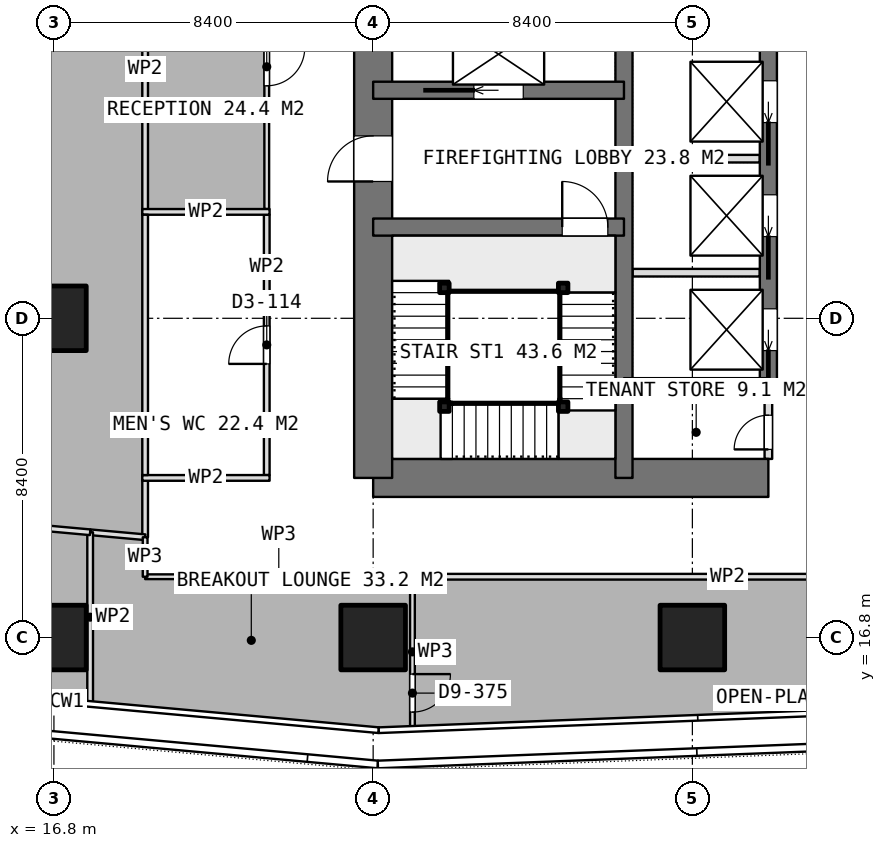
"""IFC4 building model, lengths in metres.
Left out: names, types, materials, properties, quantities, classifications, styles, units other than length and angle.
Written with IfcOpenShell. Run it as: python <this file> out.ifc"""

import sys

from ifc_helpers import new_model, si_unit, direction, frame, frame_2d, origin, origin_2d, place, context, subcontext, project, spatial, rectangle, extrude, element, fill, save


model = new_model("IFC4")
c1 = context("Model", 3, precision=1e-05, world=origin(), true_north=direction((0.0, 1.0)))
c2 = subcontext(c1, "Body", "Model", "MODEL_VIEW")
j1 = project(units=[si_unit("LENGTHUNIT", "METRE"), si_unit("PLANEANGLEUNIT", "RADIAN")], contexts=[c1])
p1 = place(None, origin())
s1 = spatial("IfcSite", under=j1, at=p1, CompositionType="ELEMENT")
p2 = place(p1, origin())
s2 = spatial("IfcBuilding", under=s1, at=p2, CompositionType="ELEMENT")
p3 = place(p2, frame((0.0, 0.0, 110.3)))
s3 = spatial("IfcBuildingStorey", under=s2, at=p3, CompositionType="ELEMENT", Elevation=110.3)
p4 = place(p3, frame((25.2, 21.0, 0.0), z_axis=(0.0, 0.0, 1.0), x_axis=(1.0, 0.0, 0.0)))
e1 = element("IfcWall", 1, at=p4, inside=s3, PredefinedType="SHEAR", context=c2, shape_type="SweptSolid", body=[
    extrude(rectangle(XDim=10.4, YDim=1.0, at=frame_2d((5.2, 0.0))), origin(), (0.0, 0.0, 1.0), 3.75),
])
p5 = place(p3, frame((25.2, 21.0, 0.0), z_axis=(0.0, 0.0, 1.0), x_axis=(0.0, 1.0, 0.0)))
e2 = element("IfcWall", 2, at=p5, inside=s3, PredefinedType="SHEAR", context=c2, shape_type="SweptSolid", body=[
    extrude(rectangle(XDim=25.2, YDim=1.0, at=frame_2d((12.6, 0.0))), origin(), (0.0, 0.0, 1.0), 3.75),
])
p6 = place(p5, frame((7.8, 0.0, 0.0)))
e3 = element("IfcOpeningElement", 3, at=p6, cuts=e2, PredefinedType="OPENING", context=c2, shape_type="SweptSolid", body=[
    extrude(rectangle(XDim=1.2, YDim=2.1, at=frame_2d((0.6, 1.05))), frame((0.0, 0.51, 0.0), z_axis=(0.0, -1.0, 0.0), x_axis=(1.0, 0.0, 0.0)), (0.0, 0.0, 1.0), 1.02),
])
p7 = place(p5, frame((14.25, 0.0, 0.0)))
e4 = element("IfcOpeningElement", 4, at=p7, cuts=e2, PredefinedType="OPENING", context=c2, shape_type="SweptSolid", body=[
    extrude(rectangle(XDim=0.9, YDim=2.1, at=frame_2d((0.45, 1.05))), frame((0.0, 0.51, 0.0), z_axis=(0.0, -1.0, 0.0), x_axis=(1.0, 0.0, 0.0)), (0.0, 0.0, 1.0), 1.02),
])
p8 = place(p5, frame((16.85, 0.0, 0.0)))
e5 = element("IfcOpeningElement", 5, at=p8, cuts=e2, PredefinedType="OPENING", context=c2, shape_type="SweptSolid", body=[
    extrude(rectangle(XDim=0.9, YDim=2.1, at=frame_2d((0.45, 1.05))), frame((0.0, 0.51, 0.0), z_axis=(0.0, -1.0, 0.0), x_axis=(1.0, 0.0, 0.0)), (0.0, 0.0, 1.0), 1.02),
])
p9 = place(p5, frame((19.025, 0.0, 0.0)))
e6 = element("IfcOpeningElement", 6, at=p9, cuts=e2, PredefinedType="OPENING", context=c2, shape_type="SweptSolid", body=[
    extrude(rectangle(XDim=1.2, YDim=2.1, at=frame_2d((0.6, 1.05))), frame((0.0, 0.51, 0.0), z_axis=(0.0, -1.0, 0.0), x_axis=(1.0, 0.0, 0.0)), (0.0, 0.0, 1.0), 1.02),
])
p10 = place(p3, frame((31.8, 21.0, 0.0), z_axis=(0.0, 0.0, 1.0), x_axis=(0.0, 1.0, 0.0)))
e7 = element("IfcWall", 7, at=p10, inside=s3, PredefinedType="SHEAR", context=c2, shape_type="SweptSolid", body=[
    extrude(rectangle(XDim=25.2, YDim=0.45, at=frame_2d((12.6, 0.0))), origin(), (0.0, 0.0, 1.0), 3.75),
])
p11 = place(p3, frame((35.6, 23.4, 0.0), z_axis=(0.0, 0.0, 1.0), x_axis=(0.0, 1.0, 0.0)))
e8 = element("IfcWall", 8, at=p11, inside=s3, PredefinedType="SHEAR", context=c2, shape_type="SweptSolid", body=[
    extrude(rectangle(XDim=18.0, YDim=0.45, at=frame_2d((9.0, 0.0))), origin(), (0.0, 0.0, 1.0), 3.75),
])
p12 = place(p11, frame((0.95, 0.0, 0.0)))
e9 = element("IfcOpeningElement", 9, at=p12, cuts=e8, PredefinedType="OPENING", context=c2, shape_type="SweptSolid", body=[
    extrude(rectangle(XDim=1.1, YDim=2.1, at=frame_2d((0.55, 1.05))), frame((0.0, 0.235, 0.0), z_axis=(0.0, -1.0, 0.0), x_axis=(1.0, 0.0, 0.0)), (0.0, 0.0, 1.0), 0.47),
])
p13 = place(p11, frame((3.95, 0.0, 0.0)))
e10 = element("IfcOpeningElement", 10, at=p13, cuts=e8, PredefinedType="OPENING", context=c2, shape_type="SweptSolid", body=[
    extrude(rectangle(XDim=1.1, YDim=2.1, at=frame_2d((0.55, 1.05))), frame((0.0, 0.235, 0.0), z_axis=(0.0, -1.0, 0.0), x_axis=(1.0, 0.0, 0.0)), (0.0, 0.0, 1.0), 0.47),
])
p14 = place(p11, frame((6.95, 0.0, 0.0)))
e11 = element("IfcOpeningElement", 11, at=p14, cuts=e8, PredefinedType="OPENING", context=c2, shape_type="SweptSolid", body=[
    extrude(rectangle(XDim=1.1, YDim=2.1, at=frame_2d((0.55, 1.05))), frame((0.0, 0.235, 0.0), z_axis=(0.0, -1.0, 0.0), x_axis=(1.0, 0.0, 0.0)), (0.0, 0.0, 1.0), 0.47),
])
p15 = place(p11, frame((9.95, 0.0, 0.0)))
e12 = element("IfcOpeningElement", 12, at=p15, cuts=e8, PredefinedType="OPENING", context=c2, shape_type="SweptSolid", body=[
    extrude(rectangle(XDim=1.1, YDim=2.1, at=frame_2d((0.55, 1.05))), frame((0.0, 0.235, 0.0), z_axis=(0.0, -1.0, 0.0), x_axis=(1.0, 0.0, 0.0)), (0.0, 0.0, 1.0), 0.47),
])
p16 = place(p11, frame((12.95, 0.0, 0.0)))
e13 = element("IfcOpeningElement", 13, at=p16, cuts=e8, PredefinedType="OPENING", context=c2, shape_type="SweptSolid", body=[
    extrude(rectangle(XDim=1.1, YDim=2.1, at=frame_2d((0.55, 1.05))), frame((0.0, 0.235, 0.0), z_axis=(0.0, -1.0, 0.0), x_axis=(1.0, 0.0, 0.0)), (0.0, 0.0, 1.0), 0.47),
])
p17 = place(p11, frame((15.95, 0.0, 0.0)))
e14 = element("IfcOpeningElement", 14, at=p17, cuts=e8, PredefinedType="OPENING", context=c2, shape_type="SweptSolid", body=[
    extrude(rectangle(XDim=1.1, YDim=2.1, at=frame_2d((0.55, 1.05))), frame((0.0, 0.235, 0.0), z_axis=(0.0, -1.0, 0.0), x_axis=(1.0, 0.0, 0.0)), (0.0, 0.0, 1.0), 0.47),
])
p18 = place(p3, frame((31.8, 23.4, 0.0), z_axis=(0.0, 0.0, 1.0), x_axis=(1.0, 0.0, 0.0)))
e15 = element("IfcWall", 15, at=p18, inside=s3, PredefinedType="SHEAR", context=c2, shape_type="SweptSolid", body=[
    extrude(rectangle(XDim=3.8, YDim=0.45, at=frame_2d((1.9, 0.0))), origin(), (0.0, 0.0, 1.0), 3.75),
])
p19 = place(p3, frame((25.2, 27.6, 0.0), z_axis=(0.0, 0.0, 1.0), x_axis=(1.0, 0.0, 0.0)))
e16 = element("IfcWall", 16, at=p19, inside=s3, PredefinedType="SHEAR", context=c2, shape_type="SweptSolid", body=[
    extrude(rectangle(XDim=6.6, YDim=0.45, at=frame_2d((3.3, 0.0))), origin(), (0.0, 0.0, 1.0), 3.75),
])
p20 = place(p19, frame((4.975, 0.0, 0.0)))
e17 = element("IfcOpeningElement", 17, at=p20, cuts=e16, PredefinedType="OPENING", context=c2, shape_type="SweptSolid", body=[
    extrude(rectangle(XDim=1.2, YDim=2.1, at=frame_2d((0.6, 1.05))), frame((0.0, 0.235, 0.0), z_axis=(0.0, -1.0, 0.0), x_axis=(1.0, 0.0, 0.0)), (0.0, 0.0, 1.0), 0.47),
])
p21 = place(p3, frame((25.2, 31.2, 0.0), z_axis=(0.0, 0.0, 1.0), x_axis=(1.0, 0.0, 0.0)))
e18 = element("IfcWall", 18, at=p21, inside=s3, PredefinedType="SHEAR", context=c2, shape_type="SweptSolid", body=[
    extrude(rectangle(XDim=6.6, YDim=0.45, at=frame_2d((3.3, 0.0))), origin(), (0.0, 0.0, 1.0), 3.75),
])
p22 = place(p21, frame((2.65, 0.0, 0.0)))
e19 = element("IfcOpeningElement", 19, at=p22, cuts=e18, PredefinedType="OPENING", context=c2, shape_type="SweptSolid", body=[
    extrude(rectangle(XDim=1.3, YDim=2.1, at=frame_2d((0.65, 1.05))), frame((0.0, 0.235, 0.0), z_axis=(0.0, -1.0, 0.0), x_axis=(1.0, 0.0, 0.0)), (0.0, 0.0, 1.0), 0.47),
])
for number, where, z_axis, x_axis in (
    (20, (16.8, 16.8, 0.0), (0.0, 0.0, 1.0), (1.0, 0.0, 0.0)),
    (21, (16.8, 25.2, 0.0), (0.0, 0.0, 1.0), (1.0, 0.0, 0.0)),
    (22, (25.2, 16.8, 0.0), (0.0, 0.0, 1.0), (1.0, 0.0, 0.0)),
    (23, (33.6, 16.8, 0.0), (0.0, 0.0, 1.0), (1.0, 0.0, 0.0)),
):
    element("IfcColumn", number, at=place(p3, frame(where, z_axis=z_axis, x_axis=x_axis)), inside=s3, PredefinedType="COLUMN", context=c2, shape_type="SweptSolid", body=[
        extrude(rectangle(XDim=1.7, YDim=1.7, at=origin_2d()), origin(), (0.0, 0.0, 1.0), 3.75),
    ])
for number, where, z_axis, x_axis in (
    (24, (32.025, 26.4, 0.0), (0.0, 0.0, 1.0), (1.0, 0.0, 0.0)),
    (25, (32.025, 29.4, 0.0), (0.0, 0.0, 1.0), (1.0, 0.0, 0.0)),
):
    element("IfcWall", number, at=place(p3, frame(where, z_axis=z_axis, x_axis=x_axis)), inside=s3, PredefinedType="PARTITIONING", context=c2, shape_type="SweptSolid", body=[
        extrude(rectangle(XDim=3.35, YDim=0.2, at=frame_2d((1.675, 0.0))), origin(), (0.0, 0.0, 1.0), 3.5),
    ])
p23 = place(p3, frame((35.6, 21.5, 0.0), z_axis=(0.0, 0.0, 1.0), x_axis=(0.0, 1.0, 0.0)))
e26 = element("IfcWall", 26, at=p23, inside=s3, PredefinedType="PARTITIONING", context=c2, shape_type="SweptSolid", body=[
    extrude(rectangle(XDim=1.675, YDim=0.2, at=frame_2d((0.837, 0.0))), origin(), (0.0, 0.0, 1.0), 3.5),
])
p24 = place(p23, frame((0.25, 0.0, 0.0)))
e27 = element("IfcOpeningElement", 27, at=p24, cuts=e26, PredefinedType="OPENING", context=c2, shape_type="SweptSolid", body=[
    extrude(rectangle(XDim=0.9, YDim=2.1, at=frame_2d((0.45, 1.05))), frame((0.0, 0.11, 0.0), z_axis=(0.0, -1.0, 0.0), x_axis=(1.0, 0.0, 0.0)), (0.0, 0.0, 1.0), 0.22),
])
for number, where, z_axis, x_axis in (
    (28, (19.125, 21.0, 0.0), (0.0, 0.0, 1.0), (1.0, 0.0, 0.0)),
    (29, (19.125, 28.0, 0.0), (0.0, 0.0, 1.0), (1.0, 0.0, 0.0)),
):
    element("IfcWall", number, at=place(p3, frame(where, z_axis=z_axis, x_axis=x_axis)), inside=s3, PredefinedType="PARTITIONING", context=c2, shape_type="SweptSolid", body=[
        extrude(rectangle(XDim=3.35, YDim=0.15, at=frame_2d((1.675, 0.0))), origin(), (0.0, 0.0, 1.0), 3.5),
    ])
p25 = place(p3, frame((19.2, 21.075, 0.0), z_axis=(0.0, 0.0, 1.0), x_axis=(0.0, 1.0, 0.0)))
e30 = element("IfcWall", 30, at=p25, inside=s3, PredefinedType="PARTITIONING", context=c2, shape_type="SweptSolid", body=[
    extrude(rectangle(XDim=6.85, YDim=0.15, at=frame_2d((3.425, 0.0))), origin(), (0.0, 0.0, 1.0), 3.5),
])
p26 = place(p3, frame((22.4, 21.075, 0.0), z_axis=(0.0, 0.0, 1.0), x_axis=(0.0, 1.0, 0.0)))
e31 = element("IfcWall", 31, at=p26, inside=s3, PredefinedType="PARTITIONING", context=c2, shape_type="SweptSolid", body=[
    extrude(rectangle(XDim=6.85, YDim=0.15, at=frame_2d((3.425, 0.0))), origin(), (0.0, 0.0, 1.0), 3.5),
])
p27 = place(p26, frame((2.925, 0.0, 0.0)))
e32 = element("IfcOpeningElement", 32, at=p27, cuts=e31, PredefinedType="OPENING", context=c2, shape_type="SweptSolid", body=[
    extrude(rectangle(XDim=1.0, YDim=2.1, at=frame_2d((0.5, 1.05))), frame((0.0, 0.085, 0.0), z_axis=(0.0, -1.0, 0.0), x_axis=(1.0, 0.0, 0.0)), (0.0, 0.0, 1.0), 0.17),
])
p28 = place(p3, frame((19.2, 35.575, 0.0), z_axis=(0.0, 0.0, 1.0), x_axis=(0.0, -1.0, 0.0)))
e33 = element("IfcWall", 33, at=p28, inside=s3, PredefinedType="PARTITIONING", context=c2, shape_type="SweptSolid", body=[
    extrude(rectangle(XDim=7.65, YDim=0.15, at=frame_2d((3.825, 0.0))), origin(), (0.0, 0.0, 1.0), 3.5),
])
p29 = place(p3, frame((19.2, 21.075, 0.0), z_axis=(0.0, 0.0, 1.0), x_axis=(0.0, -1.0, 0.0)))
e34 = element("IfcWall", 34, at=p29, inside=s3, PredefinedType="PARTITIONING", context=c2, shape_type="SweptSolid", body=[
    extrude(rectangle(XDim=1.636, YDim=0.15, at=frame_2d((0.818, 0.0))), origin(), (0.0, 0.0, 1.0), 3.5),
])
p30 = place(p3, frame((19.2, 19.439, 0.0), z_axis=(0.0, 0.0, 1.0), x_axis=(-0.995920706464, 0.090232734836, 0.0)))
e35 = element("IfcWall", 35, at=p30, inside=s3, PredefinedType="PARTITIONING", context=c2, shape_type="SweptSolid", body=[
    extrude(rectangle(XDim=1.453, YDim=0.15, at=frame_2d((0.727, 0.0))), origin(), (0.0, 0.0, 1.0), 3.5),
])
p31 = place(p3, frame((17.753, 19.57, 0.0), z_axis=(0.0, 0.0, 1.0), x_axis=(0.0, -1.0, 0.0)))
e36 = element("IfcWall", 36, at=p31, inside=s3, PredefinedType="PARTITIONING", context=c2, shape_type="SweptSolid", body=[
    extrude(rectangle(XDim=4.468, YDim=0.15, at=frame_2d((2.234, 0.0))), origin(), (0.0, 0.0, 1.0), 3.5),
])
p32 = place(p3, frame((17.752, 19.57, 0.0), z_axis=(0.0, 0.0, 1.0), x_axis=(-0.995899251229, 0.090469229029, 0.0)))
e37 = element("IfcWall", 37, at=p32, inside=s3, PredefinedType="PARTITIONING", context=c2, shape_type="SweptSolid", body=[
    extrude(rectangle(XDim=6.288, YDim=0.15, at=frame_2d((3.144, 0.0))), origin(), (0.0, 0.0, 1.0), 3.5),
])
p33 = place(p32, frame((2.644, 0.0, 0.0)))
e38 = element("IfcOpeningElement", 38, at=p33, cuts=e37, PredefinedType="OPENING", context=c2, shape_type="SweptSolid", body=[
    extrude(rectangle(XDim=1.0, YDim=2.1, at=frame_2d((0.5, 1.05))), frame((0.0, 0.085, 0.0), z_axis=(0.0, -1.0, 0.0), x_axis=(1.0, 0.0, 0.0)), (0.0, 0.0, 1.0), 0.17),
])
p34 = place(p3, frame((19.2, 18.4, 0.0), z_axis=(0.0, 0.0, 1.0), x_axis=(1.0, 0.0, 0.0)))
e39 = element("IfcWall", 39, at=p34, inside=s3, PredefinedType="PARTITIONING", context=c2, shape_type="SweptSolid", body=[
    extrude(rectangle(XDim=7.034, YDim=0.125, at=frame_2d((3.517, 0.0))), origin(), (0.0, 0.0, 1.0), 3.5),
])
p35 = place(p3, frame((26.234, 18.4, 0.0), z_axis=(0.0, 0.0, 1.0), x_axis=(0.0, -1.0, 0.0)))
e40 = element("IfcWall", 40, at=p35, inside=s3, PredefinedType="PARTITIONING", context=c2, shape_type="SweptSolid", body=[
    extrude(rectangle(XDim=3.954, YDim=0.125, at=frame_2d((1.977, 0.0))), origin(), (0.0, 0.0, 1.0), 3.5),
])
p36 = place(p35, frame((2.562, 0.0, 0.0)))
e41 = element("IfcOpeningElement", 41, at=p36, cuts=e40, PredefinedType="OPENING", context=c2, shape_type="SweptSolid", body=[
    extrude(rectangle(XDim=1.0, YDim=2.1, at=frame_2d((0.5, 1.05))), frame((0.0, 0.073, 0.0), z_axis=(0.0, -1.0, 0.0), x_axis=(1.0, 0.0, 0.0)), (0.0, 0.0, 1.0), 0.145),
])
p37 = place(p3, frame((19.2, 19.439, 0.0), z_axis=(0.0, 0.0, 1.0), x_axis=(0.0, -1.0, 0.0)))
e42 = element("IfcWall", 42, at=p37, inside=s3, PredefinedType="PARTITIONING", context=c2, shape_type="SweptSolid", body=[
    extrude(rectangle(XDim=1.039, YDim=0.125, at=frame_2d((0.52, 0.0))), origin(), (0.0, 0.0, 1.0), 3.5),
])
p38 = place(p3, frame((22.4, 35.637, 0.0), z_axis=(0.0, 0.0, 1.0), x_axis=(0.0, -1.0, 0.0)))
e43 = element("IfcWall", 43, at=p38, inside=s3, PredefinedType="PARTITIONING", context=c2, shape_type="SweptSolid", body=[
    extrude(rectangle(XDim=7.562, YDim=0.125, at=frame_2d((3.781, 0.0))), origin(), (0.0, 0.0, 1.0), 3.5),
])
p39 = place(p38, frame((3.319, 0.0, 0.0)))
e44 = element("IfcOpeningElement", 44, at=p39, cuts=e43, PredefinedType="OPENING", context=c2, shape_type="SweptSolid", body=[
    extrude(rectangle(XDim=1.0, YDim=2.1, at=frame_2d((0.5, 1.05))), frame((0.0, 0.073, 0.0), z_axis=(0.0, -1.0, 0.0), x_axis=(1.0, 0.0, 0.0)), (0.0, 0.0, 1.0), 0.145),
])
p40 = place(p3, frame((26.234, 18.4, 0.0), z_axis=(0.0, 0.0, 1.0), x_axis=(1.0, 0.0, 0.0)))
e45 = element("IfcWall", 45, at=p40, inside=s3, PredefinedType="PARTITIONING", context=c2, shape_type="SweptSolid", body=[
    extrude(rectangle(XDim=23.702, YDim=0.15, at=frame_2d((11.851, 0.0))), origin(), (0.0, 0.0, 1.0), 3.5),
])
p41 = place(p40, frame((11.351, 0.0, 0.0)))
e46 = element("IfcOpeningElement", 46, at=p41, cuts=e45, PredefinedType="OPENING", context=c2, shape_type="SweptSolid", body=[
    extrude(rectangle(XDim=1.0, YDim=2.1, at=frame_2d((0.5, 1.05))), frame((0.0, 0.085, 0.0), z_axis=(0.0, -1.0, 0.0), x_axis=(1.0, 0.0, 0.0)), (0.0, 0.0, 1.0), 0.17),
])
for number, where, z_axis, x_axis in (
    (47, (30.2, 26.0, 0.0), (0.0, 0.0, 1.0), (1.0, 0.0, 0.0)),
    (48, (30.2, 22.875, 0.0), (0.0, 0.0, 1.0), (1.0, 0.0, 0.0)),
    (49, (27.075, 22.875, 0.0), (0.0, 0.0, 1.0), (1.0, 0.0, 0.0)),
    (50, (27.075, 26.0, 0.0), (0.0, 0.0, 1.0), (1.0, 0.0, 0.0)),
):
    element("IfcColumn", number, at=place(p3, frame(where, z_axis=z_axis, x_axis=x_axis)), inside=s3, PredefinedType="COLUMN", context=c2, shape_type="SweptSolid", body=[
        extrude(rectangle(XDim=0.25, YDim=0.25, at=origin_2d()), origin(), (0.0, 0.0, 1.0), 3.75),
    ])
p42 = place(p6, origin())
e51 = element("IfcDoor", 51, at=p42, inside=s3, OperationType="SINGLE_SWING_LEFT", PredefinedType="DOOR", context=c2, shape_type="SweptSolid", body=[
    extrude(rectangle(XDim=1.2, YDim=2.1, at=frame_2d((0.6, 1.05))), frame((0.0, 0.025, 0.0), z_axis=(0.0, -1.0, 0.0), x_axis=(1.0, 0.0, 0.0)), (0.0, 0.0, 1.0), 0.05),
])
fill(e3, e51)
p43 = place(p24, origin())
e52 = element("IfcDoor", 52, at=p43, inside=s3, OperationType="SINGLE_SWING_LEFT", PredefinedType="DOOR", context=c2, shape_type="SweptSolid", body=[
    extrude(rectangle(XDim=0.9, YDim=2.1, at=frame_2d((0.45, 1.05))), frame((0.0, 0.025, 0.0), z_axis=(0.0, -1.0, 0.0), x_axis=(1.0, 0.0, 0.0)), (0.0, 0.0, 1.0), 0.05),
])
fill(e27, e52)
p44 = place(p12, origin())
e53 = element("IfcDoor", 53, at=p44, inside=s3, OperationType="SLIDING_TO_LEFT", PredefinedType="USERDEFINED", context=c2, shape_type="SweptSolid", body=[
    extrude(rectangle(XDim=1.1, YDim=2.1, at=frame_2d((0.55, 1.05))), frame((0.0, 0.025, 0.0), z_axis=(0.0, -1.0, 0.0), x_axis=(1.0, 0.0, 0.0)), (0.0, 0.0, 1.0), 0.05),
])
fill(e9, e53)
p45 = place(p13, origin())
e54 = element("IfcDoor", 54, at=p45, inside=s3, OperationType="SLIDING_TO_LEFT", PredefinedType="USERDEFINED", context=c2, shape_type="SweptSolid", body=[
    extrude(rectangle(XDim=1.1, YDim=2.1, at=frame_2d((0.55, 1.05))), frame((0.0, 0.025, 0.0), z_axis=(0.0, -1.0, 0.0), x_axis=(1.0, 0.0, 0.0)), (0.0, 0.0, 1.0), 0.05),
])
fill(e10, e54)
p46 = place(p14, origin())
e55 = element("IfcDoor", 55, at=p46, inside=s3, OperationType="SLIDING_TO_LEFT", PredefinedType="USERDEFINED", context=c2, shape_type="SweptSolid", body=[
    extrude(rectangle(XDim=1.1, YDim=2.1, at=frame_2d((0.55, 1.05))), frame((0.0, 0.025, 0.0), z_axis=(0.0, -1.0, 0.0), x_axis=(1.0, 0.0, 0.0)), (0.0, 0.0, 1.0), 0.05),
])
fill(e11, e55)
p47 = place(p22, origin())
e56 = element("IfcDoor", 56, at=p47, inside=s3, OperationType="SLIDING_TO_LEFT", PredefinedType="USERDEFINED", context=c2, shape_type="SweptSolid", body=[
    extrude(rectangle(XDim=1.3, YDim=2.1, at=frame_2d((0.65, 1.05))), frame((0.0, 0.025, 0.0), z_axis=(0.0, -1.0, 0.0), x_axis=(1.0, 0.0, 0.0)), (0.0, 0.0, 1.0), 0.05),
])
fill(e19, e56)
p48 = place(p27, origin())
e57 = element("IfcDoor", 57, at=p48, inside=s3, OperationType="SINGLE_SWING_LEFT", PredefinedType="DOOR", context=c2, shape_type="SweptSolid", body=[
    extrude(rectangle(XDim=1.0, YDim=2.1, at=frame_2d((0.5, 1.05))), frame((0.0, 0.025, 0.0), z_axis=(0.0, -1.0, 0.0), x_axis=(1.0, 0.0, 0.0)), (0.0, 0.0, 1.0), 0.05),
])
fill(e32, e57)
p49 = place(p36, origin())
e58 = element("IfcDoor", 58, at=p49, inside=s3, OperationType="SINGLE_SWING_LEFT", PredefinedType="DOOR", context=c2, shape_type="SweptSolid", body=[
    extrude(rectangle(XDim=1.0, YDim=2.1, at=frame_2d((0.5, 1.05))), frame((0.0, 0.025, 0.0), z_axis=(0.0, -1.0, 0.0), x_axis=(1.0, 0.0, 0.0)), (0.0, 0.0, 1.0), 0.05),
])
fill(e41, e58)
p50 = place(p39, origin())
e59 = element("IfcDoor", 59, at=p50, inside=s3, OperationType="SINGLE_SWING_LEFT", PredefinedType="DOOR", context=c2, shape_type="SweptSolid", body=[
    extrude(rectangle(XDim=1.0, YDim=2.1, at=frame_2d((0.5, 1.05))), frame((0.0, 0.025, 0.0), z_axis=(0.0, -1.0, 0.0), x_axis=(1.0, 0.0, 0.0)), (0.0, 0.0, 1.0), 0.05),
])
fill(e44, e59)
p51 = place(p20, origin())
e60 = element("IfcDoor", 60, at=p51, inside=s3, OperationType="SINGLE_SWING_RIGHT", PredefinedType="DOOR", context=c2, shape_type="SweptSolid", body=[
    extrude(rectangle(XDim=1.2, YDim=2.1, at=frame_2d((0.6, 1.05))), frame((0.0, 0.025, 0.0), z_axis=(0.0, -1.0, 0.0), x_axis=(1.0, 0.0, 0.0)), (0.0, 0.0, 1.0), 0.05),
])
fill(e17, e60)
save(model, sys.argv[1])
